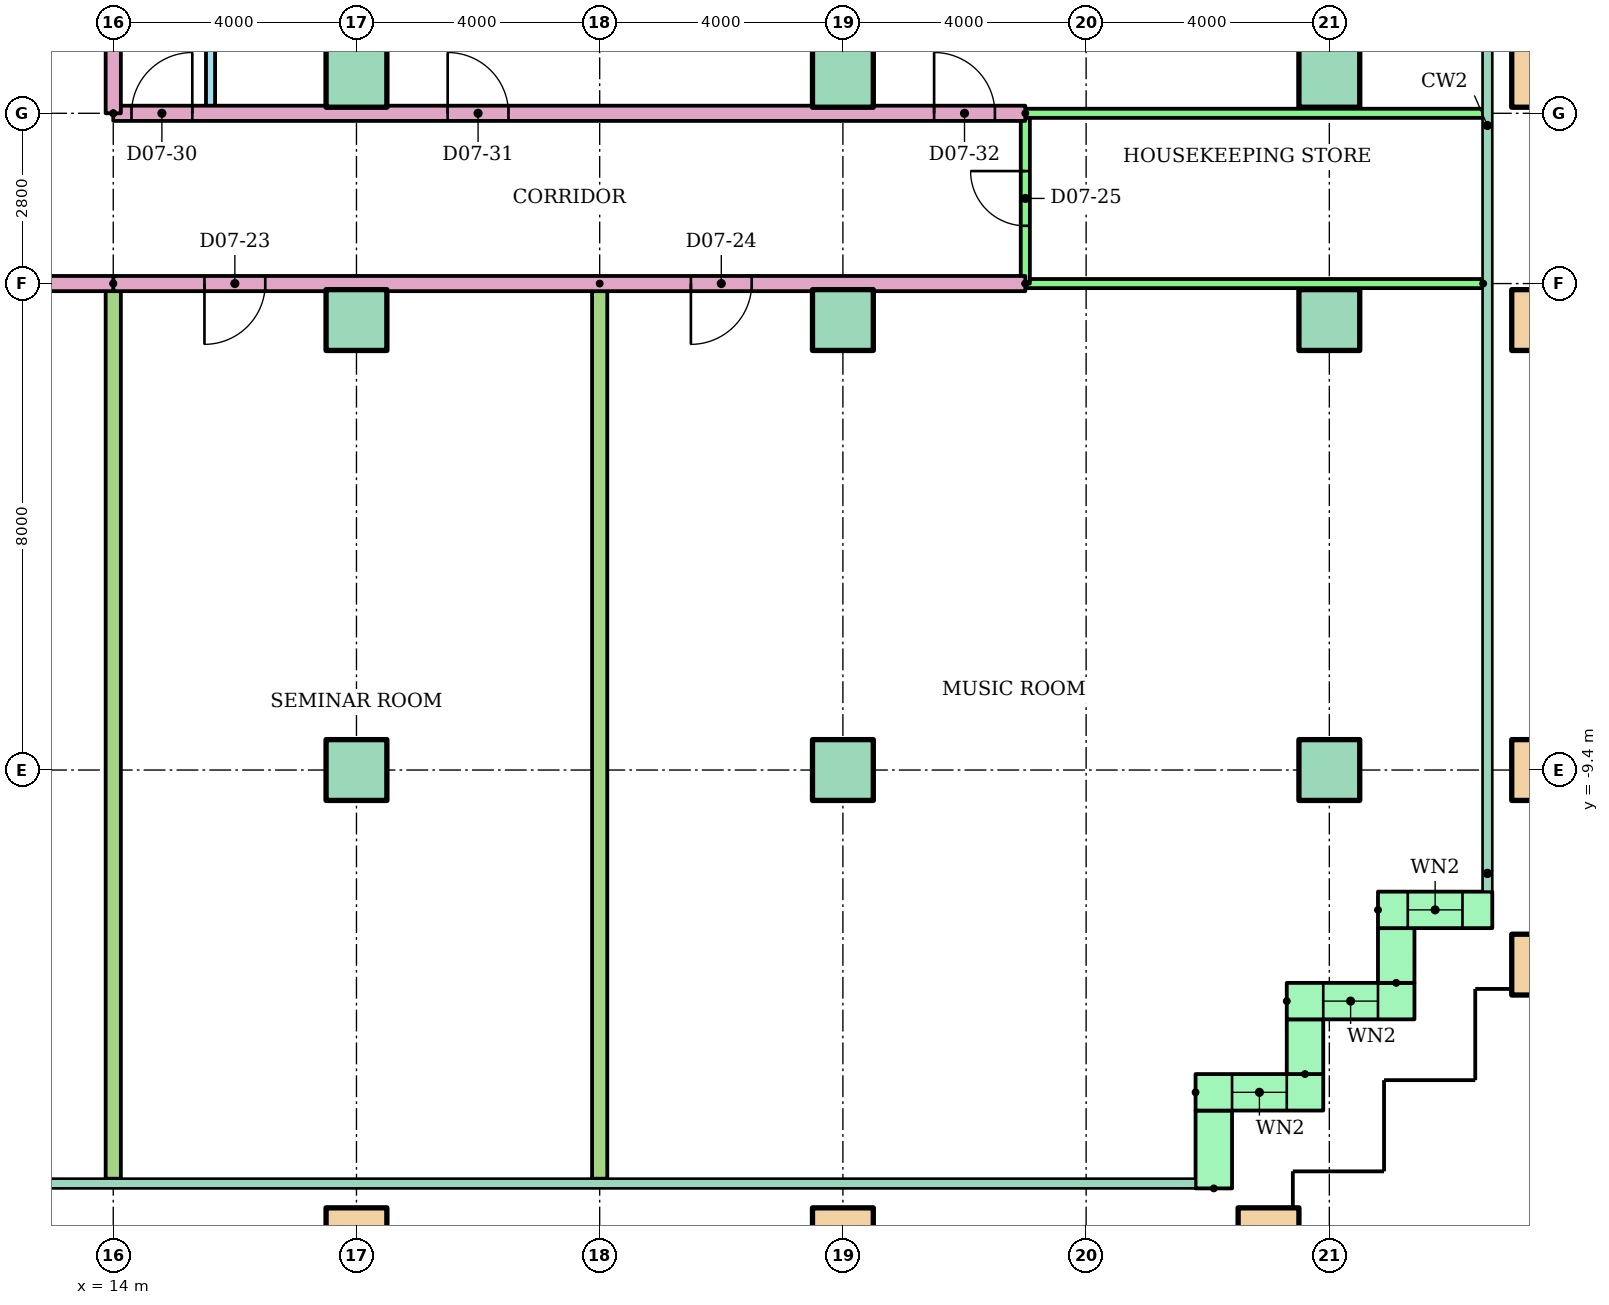
"""IFC4 building model, lengths in metres.
Left out: names, types, materials, properties, quantities, classifications, styles, units other than length and angle.
Written with IfcOpenShell. Run it as: python <this file> out.ifc"""

import sys

from ifc_helpers import new_model, si_unit, direction, frame, frame_2d, origin, origin_2d, place, context, subcontext, project, spatial, rectangle, hollow_rectangle, extrude, element, fill, save


model = new_model("IFC4")
c1 = context("Model", 3, precision=1e-05, world=origin(), true_north=direction((0.0, 1.0)))
c2 = subcontext(c1, "Body", "Model", "MODEL_VIEW")
j1 = project(units=[si_unit("LENGTHUNIT", "METRE"), si_unit("PLANEANGLEUNIT", "RADIAN")], contexts=[c1])
p1 = place(None, origin())
s1 = spatial("IfcSite", under=j1, at=p1, CompositionType="ELEMENT")
p2 = place(p1, origin())
s2 = spatial("IfcBuilding", under=s1, at=p2, CompositionType="ELEMENT")
p3 = place(p2, frame((0.0, 0.0, 29.9)))
s3 = spatial("IfcBuildingStorey", under=s2, at=p3, CompositionType="ELEMENT", Elevation=29.9)
for number, where in (
    (1, (18.0, -17.1, 0.0)),
    (2, (26.0, -17.1, 0.0)),
    (3, (33.0, -17.1, 0.0)),
    (4, (37.5, -12.6, 0.0)),
):
    element("IfcColumn", number, at=place(p3, frame(where)), inside=s3, PredefinedType="COLUMN", context=c2, shape_type="SweptSolid", body=[
        extrude(hollow_rectangle(XDim=1.0, YDim=1.0, WallThickness=0.05, at=origin_2d()), origin(), (0.0, 0.0, 1.0), 3.9),
    ])
for number, where in (
    (5, (18.0, -9.4, 0.0)),
    (6, (26.0, -9.4, 0.0)),
    (7, (34.0, -9.4, 0.0)),
):
    element("IfcColumn", number, at=place(p3, frame(where)), inside=s3, PredefinedType="COLUMN", context=c2, shape_type="SweptSolid", body=[
        extrude(rectangle(XDim=1.0, YDim=1.0, at=origin_2d()), origin(), (0.0, 0.0, 1.0), 3.9),
    ])
p4 = place(p3, frame((37.5, -9.4, 0.0)))
e8 = element("IfcColumn", 8, at=p4, inside=s3, PredefinedType="COLUMN", context=c2, shape_type="SweptSolid", body=[
    extrude(hollow_rectangle(XDim=1.0, YDim=1.0, WallThickness=0.05, at=origin_2d()), origin(), (0.0, 0.0, 1.0), 3.9),
])
for number, where in (
    (9, (18.0, -2.0, 0.0)),
    (10, (26.0, -2.0, 0.0)),
    (11, (34.0, -2.0, 0.0)),
):
    element("IfcColumn", number, at=place(p3, frame(where)), inside=s3, PredefinedType="COLUMN", context=c2, shape_type="SweptSolid", body=[
        extrude(rectangle(XDim=1.0, YDim=1.0, at=origin_2d()), origin(), (0.0, 0.0, 1.0), 3.9),
    ])
p5 = place(p3, frame((37.5, -2.0, 0.0)))
e12 = element("IfcColumn", 12, at=p5, inside=s3, PredefinedType="COLUMN", context=c2, shape_type="SweptSolid", body=[
    extrude(hollow_rectangle(XDim=1.0, YDim=1.0, WallThickness=0.05, at=origin_2d()), origin(), (0.0, 0.0, 1.0), 3.9),
])
for number, where in (
    (13, (18.0, 2.0, 0.0)),
    (14, (26.0, 2.0, 0.0)),
    (15, (34.0, 2.0, 0.0)),
):
    element("IfcColumn", number, at=place(p3, frame(where)), inside=s3, PredefinedType="COLUMN", context=c2, shape_type="SweptSolid", body=[
        extrude(rectangle(XDim=1.0, YDim=1.0, at=origin_2d()), origin(), (0.0, 0.0, 1.0), 3.9),
    ])
p6 = place(p3, frame((37.5, 2.0, 0.0)))
e16 = element("IfcColumn", 16, at=p6, inside=s3, PredefinedType="COLUMN", context=c2, shape_type="SweptSolid", body=[
    extrude(hollow_rectangle(XDim=1.0, YDim=1.0, WallThickness=0.05, at=origin_2d()), origin(), (0.0, 0.0, 1.0), 3.9),
])
p7 = place(p3, frame((32.1, -16.28, 0.0), z_axis=(0.0, 0.0, 1.0), x_axis=(0.0, 1.0, 0.0)))
e17 = element("IfcWall", 17, at=p7, inside=s3, PredefinedType="STANDARD", context=c2, shape_type="SweptSolid", body=[
    extrude(rectangle(XDim=1.28, YDim=0.6, at=frame_2d((0.64, 0.0))), origin(), (0.0, 0.0, 1.0), 3.6),
])
p8 = place(p3, frame((31.8, -14.7, 0.0)))
e18 = element("IfcWall", 18, at=p8, inside=s3, PredefinedType="STANDARD", context=c2, shape_type="SweptSolid", body=[
    extrude(rectangle(XDim=2.1, YDim=0.6, at=frame_2d((1.05, 0.0))), origin(), (0.0, 0.0, 1.0), 3.6),
])
p9 = place(p8, frame((0.6, 0.0, 0.9)))
e19 = element("IfcOpeningElement", 19, at=p9, cuts=e18, PredefinedType="OPENING", context=c2, shape_type="SweptSolid", body=[
    extrude(rectangle(XDim=0.9, YDim=1.8, at=frame_2d((0.45, 0.9))), frame((0.0, 0.31, 0.0), z_axis=(0.0, -1.0, 0.0), x_axis=(1.0, 0.0, 0.0)), (0.0, 0.0, 1.0), 0.62),
])
p10 = place(p3, frame((33.6, -14.4, 0.0), z_axis=(0.0, 0.0, 1.0), x_axis=(0.0, 1.0, 0.0)))
e20 = element("IfcWall", 20, at=p10, inside=s3, PredefinedType="STANDARD", context=c2, shape_type="SweptSolid", body=[
    extrude(rectangle(XDim=0.9, YDim=0.6, at=frame_2d((0.45, 0.0))), origin(), (0.0, 0.0, 1.0), 3.6),
])
p11 = place(p3, frame((33.3, -13.2, 0.0)))
e21 = element("IfcWall", 21, at=p11, inside=s3, PredefinedType="STANDARD", context=c2, shape_type="SweptSolid", body=[
    extrude(rectangle(XDim=2.1, YDim=0.6, at=frame_2d((1.05, 0.0))), origin(), (0.0, 0.0, 1.0), 3.6),
])
p12 = place(p11, frame((0.6, 0.0, 0.9)))
e22 = element("IfcOpeningElement", 22, at=p12, cuts=e21, PredefinedType="OPENING", context=c2, shape_type="SweptSolid", body=[
    extrude(rectangle(XDim=0.9, YDim=1.8, at=frame_2d((0.45, 0.9))), frame((0.0, 0.31, 0.0), z_axis=(0.0, -1.0, 0.0), x_axis=(1.0, 0.0, 0.0)), (0.0, 0.0, 1.0), 0.62),
])
p13 = place(p3, frame((35.1, -12.9, 0.0), z_axis=(0.0, 0.0, 1.0), x_axis=(0.0, 1.0, 0.0)))
e23 = element("IfcWall", 23, at=p13, inside=s3, PredefinedType="STANDARD", context=c2, shape_type="SweptSolid", body=[
    extrude(rectangle(XDim=0.9, YDim=0.6, at=frame_2d((0.45, 0.0))), origin(), (0.0, 0.0, 1.0), 3.6),
])
p14 = place(p3, frame((34.8, -11.7, 0.0)))
e24 = element("IfcWall", 24, at=p14, inside=s3, PredefinedType="STANDARD", context=c2, shape_type="SweptSolid", body=[
    extrude(rectangle(XDim=1.88, YDim=0.6, at=frame_2d((0.94, 0.0))), origin(), (0.0, 0.0, 1.0), 3.6),
])
p15 = place(p14, frame((0.49, 0.0, 0.9)))
e25 = element("IfcOpeningElement", 25, at=p15, cuts=e24, PredefinedType="OPENING", context=c2, shape_type="SweptSolid", body=[
    extrude(rectangle(XDim=0.9, YDim=1.8, at=frame_2d((0.45, 0.9))), frame((0.0, 0.31, 0.0), z_axis=(0.0, -1.0, 0.0), x_axis=(1.0, 0.0, 0.0)), (0.0, 0.0, 1.0), 0.62),
])
p16 = place(p3, frame((29.0, -1.4, 0.0), z_axis=(0.0, 0.0, 1.0), x_axis=(-1.0, 0.0, 0.0)))
e26 = element("IfcWall", 26, at=p16, inside=s3, PredefinedType="PARTITIONING", context=c2, shape_type="SweptSolid", body=[
    extrude(rectangle(XDim=15.0, YDim=0.25, at=frame_2d((7.5, 0.0))), origin(), (0.0, 0.0, 1.0), 3.1),
])
p17 = place(p16, frame((12.5, 0.0, 0.0)))
e27 = element("IfcOpeningElement", 27, at=p17, cuts=e26, PredefinedType="OPENING", context=c2, shape_type="SweptSolid", body=[
    extrude(rectangle(XDim=1.0, YDim=2.1, at=frame_2d((0.5, 1.05))), frame((0.0, 0.135, 0.0), z_axis=(0.0, -1.0, 0.0), x_axis=(1.0, 0.0, 0.0)), (0.0, 0.0, 1.0), 0.27),
])
p18 = place(p16, frame((4.5, 0.0, 0.0)))
e28 = element("IfcOpeningElement", 28, at=p18, cuts=e26, PredefinedType="OPENING", context=c2, shape_type="SweptSolid", body=[
    extrude(rectangle(XDim=1.0, YDim=2.1, at=frame_2d((0.5, 1.05))), frame((0.0, 0.135, 0.0), z_axis=(0.0, -1.0, 0.0), x_axis=(1.0, 0.0, 0.0)), (0.0, 0.0, 1.0), 0.27),
])
p19 = place(p3, frame((36.53, -1.4, 0.0), z_axis=(0.0, 0.0, 1.0), x_axis=(-1.0, 0.0, 0.0)))
e29 = element("IfcWall", 29, at=p19, inside=s3, PredefinedType="PARTITIONING", context=c2, shape_type="SweptSolid", body=[
    extrude(rectangle(XDim=7.53, YDim=0.15, at=frame_2d((3.765, 0.0))), origin(), (0.0, 0.0, 1.0), 3.1),
])
p20 = place(p3, frame((29.0, -1.4, 0.0), z_axis=(0.0, 0.0, 1.0), x_axis=(0.0, 1.0, 0.0)))
e30 = element("IfcWall", 30, at=p20, inside=s3, PredefinedType="PARTITIONING", context=c2, shape_type="SweptSolid", body=[
    extrude(rectangle(XDim=2.8, YDim=0.15, at=frame_2d((1.4, 0.0))), origin(), (0.0, 0.0, 1.0), 3.1),
])
p21 = place(p20, frame((0.95, 0.0, 0.0)))
e31 = element("IfcOpeningElement", 31, at=p21, cuts=e30, PredefinedType="OPENING", context=c2, shape_type="SweptSolid", body=[
    extrude(rectangle(XDim=0.9, YDim=2.1, at=frame_2d((0.45, 1.05))), frame((0.0, 0.085, 0.0), z_axis=(0.0, -1.0, 0.0), x_axis=(1.0, 0.0, 0.0)), (0.0, 0.0, 1.0), 0.17),
])
for number, where, z_axis, x_axis in (
    (32, (14.0, -1.4, 0.0), (0.0, 0.0, 1.0), (0.0, -1.0, 0.0)),
    (33, (22.0, -1.4, 0.0), (0.0, 0.0, 1.0), (0.0, -1.0, 0.0)),
):
    element("IfcWall", number, at=place(p3, frame(where, z_axis=z_axis, x_axis=x_axis)), inside=s3, PredefinedType="PARTITIONING", context=c2, shape_type="SweptSolid", body=[
        extrude(rectangle(XDim=14.721, YDim=0.25, at=frame_2d((7.361, 0.0))), origin(), (0.0, 0.0, 1.0), 3.1),
    ])
p22 = place(p3, frame((14.0, 1.4, 0.0)))
e34 = element("IfcWall", 34, at=p22, inside=s3, PredefinedType="PARTITIONING", context=c2, shape_type="SweptSolid", body=[
    extrude(rectangle(XDim=15.0, YDim=0.25, at=frame_2d((7.5, 0.0))), origin(), (0.0, 0.0, 1.0), 3.1),
])
p23 = place(p22, frame((0.3, 0.0, 0.0)))
e35 = element("IfcOpeningElement", 35, at=p23, cuts=e34, PredefinedType="OPENING", context=c2, shape_type="SweptSolid", body=[
    extrude(rectangle(XDim=1.0, YDim=2.1, at=frame_2d((0.5, 1.05))), frame((0.0, 0.135, 0.0), z_axis=(0.0, -1.0, 0.0), x_axis=(1.0, 0.0, 0.0)), (0.0, 0.0, 1.0), 0.27),
])
p24 = place(p22, frame((5.5, 0.0, 0.0)))
e36 = element("IfcOpeningElement", 36, at=p24, cuts=e34, PredefinedType="OPENING", context=c2, shape_type="SweptSolid", body=[
    extrude(rectangle(XDim=1.0, YDim=2.1, at=frame_2d((0.5, 1.05))), frame((0.0, 0.135, 0.0), z_axis=(0.0, -1.0, 0.0), x_axis=(1.0, 0.0, 0.0)), (0.0, 0.0, 1.0), 0.27),
])
p25 = place(p22, frame((13.5, 0.0, 0.0)))
e37 = element("IfcOpeningElement", 37, at=p25, cuts=e34, PredefinedType="OPENING", context=c2, shape_type="SweptSolid", body=[
    extrude(rectangle(XDim=1.0, YDim=2.1, at=frame_2d((0.5, 1.05))), frame((0.0, 0.135, 0.0), z_axis=(0.0, -1.0, 0.0), x_axis=(1.0, 0.0, 0.0)), (0.0, 0.0, 1.0), 0.27),
])
p26 = place(p3, frame((29.0, 1.4, 0.0)))
e38 = element("IfcWall", 38, at=p26, inside=s3, PredefinedType="PARTITIONING", context=c2, shape_type="SweptSolid", body=[
    extrude(rectangle(XDim=7.53, YDim=0.15, at=frame_2d((3.765, 0.0))), origin(), (0.0, 0.0, 1.0), 3.1),
])
p27 = place(p3, frame((15.6, 18.521, 0.0), z_axis=(0.0, 0.0, 1.0), x_axis=(0.0, -1.0, 0.0)))
e39 = element("IfcWall", 39, at=p27, inside=s3, PredefinedType="PARTITIONING", context=c2, shape_type="SweptSolid", body=[
    extrude(rectangle(XDim=17.121, YDim=0.15, at=frame_2d((8.561, 0.0))), origin(), (0.0, 0.0, 1.0), 3.1),
])
p28 = place(p27, frame((15.071, 0.0, 0.0)))
e40 = element("IfcOpeningElement", 40, at=p28, cuts=e39, PredefinedType="OPENING", context=c2, shape_type="SweptSolid", body=[
    extrude(rectangle(XDim=0.9, YDim=2.1, at=frame_2d((0.45, 1.05))), frame((0.0, 0.085, 0.0), z_axis=(0.0, -1.0, 0.0), x_axis=(1.0, 0.0, 0.0)), (0.0, 0.0, 1.0), 0.17),
])
p29 = place(p27, frame((10.071, 0.0, 0.0)))
e41 = element("IfcOpeningElement", 41, at=p29, cuts=e39, PredefinedType="OPENING", context=c2, shape_type="SweptSolid", body=[
    extrude(rectangle(XDim=0.9, YDim=2.1, at=frame_2d((0.45, 1.05))), frame((0.0, 0.085, 0.0), z_axis=(0.0, -1.0, 0.0), x_axis=(1.0, 0.0, 0.0)), (0.0, 0.0, 1.0), 0.17),
])
p30 = place(p27, frame((5.021, 0.0, 0.0)))
e42 = element("IfcOpeningElement", 42, at=p30, cuts=e39, PredefinedType="OPENING", context=c2, shape_type="SweptSolid", body=[
    extrude(rectangle(XDim=1.0, YDim=2.1, at=frame_2d((0.5, 1.05))), frame((0.0, 0.085, 0.0), z_axis=(0.0, -1.0, 0.0), x_axis=(1.0, 0.0, 0.0)), (0.0, 0.0, 1.0), 0.17),
])
p31 = place(p27, frame((1.471, 0.0, 0.0)))
e43 = element("IfcOpeningElement", 43, at=p31, cuts=e39, PredefinedType="OPENING", context=c2, shape_type="SweptSolid", body=[
    extrude(rectangle(XDim=0.9, YDim=2.1, at=frame_2d((0.45, 1.05))), frame((0.0, 0.085, 0.0), z_axis=(0.0, -1.0, 0.0), x_axis=(1.0, 0.0, 0.0)), (0.0, 0.0, 1.0), 0.17),
])
for number, where, z_axis, x_axis in (
    (44, (18.0, 18.521, 0.0), (0.0, 0.0, 1.0), (0.0, -1.0, 0.0)),
    (45, (26.0, 18.521, 0.0), (0.0, 0.0, 1.0), (0.0, -1.0, 0.0)),
):
    element("IfcWall", number, at=place(p3, frame(where, z_axis=z_axis, x_axis=x_axis)), inside=s3, PredefinedType="PARTITIONING", context=c2, shape_type="SweptSolid", body=[
        extrude(rectangle(XDim=17.121, YDim=0.25, at=frame_2d((8.561, 0.0))), origin(), (0.0, 0.0, 1.0), 3.1),
    ])
p32 = place(p3, frame((14.0, -1.4, 0.0), z_axis=(0.0, 0.0, 1.0), x_axis=(-1.0, 0.0, 0.0)))
e46 = element("IfcWall", 46, at=p32, inside=s3, PredefinedType="PARTITIONING", context=c2, shape_type="SweptSolid", body=[
    extrude(rectangle(XDim=28.0, YDim=0.25, at=frame_2d((14.0, 0.0))), origin(), (0.0, 0.0, 1.0), 3.1),
])
p33 = place(p32, frame((25.5, 0.0, 0.0)))
e47 = element("IfcOpeningElement", 47, at=p33, cuts=e46, PredefinedType="OPENING", context=c2, shape_type="SweptSolid", body=[
    extrude(rectangle(XDim=1.0, YDim=2.1, at=frame_2d((0.5, 1.05))), frame((0.0, 0.135, 0.0), z_axis=(0.0, -1.0, 0.0), x_axis=(1.0, 0.0, 0.0)), (0.0, 0.0, 1.0), 0.27),
])
p34 = place(p32, frame((1.5, 0.0, 0.0)))
e48 = element("IfcOpeningElement", 48, at=p34, cuts=e46, PredefinedType="OPENING", context=c2, shape_type="SweptSolid", body=[
    extrude(rectangle(XDim=1.0, YDim=2.1, at=frame_2d((0.5, 1.05))), frame((0.0, 0.135, 0.0), z_axis=(0.0, -1.0, 0.0), x_axis=(1.0, 0.0, 0.0)), (0.0, 0.0, 1.0), 0.27),
])
p35 = place(p3, frame((14.0, 1.4, 0.0), z_axis=(0.0, 0.0, 1.0), x_axis=(0.0, 1.0, 0.0)))
e49 = element("IfcWall", 49, at=p35, inside=s3, PredefinedType="PARTITIONING", context=c2, shape_type="SweptSolid", body=[
    extrude(rectangle(XDim=1.6, YDim=0.25, at=frame_2d((0.8, 0.0))), origin(), (0.0, 0.0, 1.0), 3.1),
])
p36 = place(p9, origin())
e50 = element("IfcWindow", 50, at=p36, inside=s3, PartitioningType="SINGLE_PANEL", PredefinedType="WINDOW", context=c2, shape_type="SweptSolid", body=[
    extrude(rectangle(XDim=0.9, YDim=1.8, at=frame_2d((0.45, 0.9))), frame((0.0, 0.03, 0.0), z_axis=(0.0, -1.0, 0.0), x_axis=(1.0, 0.0, 0.0)), (0.0, 0.0, 1.0), 0.06),
])
fill(e19, e50)
p37 = place(p12, origin())
e51 = element("IfcWindow", 51, at=p37, inside=s3, PartitioningType="SINGLE_PANEL", PredefinedType="WINDOW", context=c2, shape_type="SweptSolid", body=[
    extrude(rectangle(XDim=0.9, YDim=1.8, at=frame_2d((0.45, 0.9))), frame((0.0, 0.03, 0.0), z_axis=(0.0, -1.0, 0.0), x_axis=(1.0, 0.0, 0.0)), (0.0, 0.0, 1.0), 0.06),
])
fill(e22, e51)
p38 = place(p15, origin())
e52 = element("IfcWindow", 52, at=p38, inside=s3, PartitioningType="SINGLE_PANEL", PredefinedType="WINDOW", context=c2, shape_type="SweptSolid", body=[
    extrude(rectangle(XDim=0.9, YDim=1.8, at=frame_2d((0.45, 0.9))), frame((0.0, 0.03, 0.0), z_axis=(0.0, -1.0, 0.0), x_axis=(1.0, 0.0, 0.0)), (0.0, 0.0, 1.0), 0.06),
])
fill(e25, e52)
p39 = place(p17, origin())
e53 = element("IfcDoor", 53, at=p39, inside=s3, OperationType="SINGLE_SWING_RIGHT", PredefinedType="DOOR", context=c2, shape_type="SweptSolid", body=[
    extrude(rectangle(XDim=1.0, YDim=2.1, at=frame_2d((0.5, 1.05))), frame((0.0, 0.025, 0.0), z_axis=(0.0, -1.0, 0.0), x_axis=(1.0, 0.0, 0.0)), (0.0, 0.0, 1.0), 0.05),
])
fill(e27, e53)
p40 = place(p18, origin())
e54 = element("IfcDoor", 54, at=p40, inside=s3, OperationType="SINGLE_SWING_RIGHT", PredefinedType="DOOR", context=c2, shape_type="SweptSolid", body=[
    extrude(rectangle(XDim=1.0, YDim=2.1, at=frame_2d((0.5, 1.05))), frame((0.0, 0.025, 0.0), z_axis=(0.0, -1.0, 0.0), x_axis=(1.0, 0.0, 0.0)), (0.0, 0.0, 1.0), 0.05),
])
fill(e28, e54)
p41 = place(p21, origin())
e55 = element("IfcDoor", 55, at=p41, inside=s3, OperationType="SINGLE_SWING_RIGHT", PredefinedType="DOOR", context=c2, shape_type="SweptSolid", body=[
    extrude(rectangle(XDim=0.9, YDim=2.1, at=frame_2d((0.45, 1.05))), frame((0.0, 0.025, 0.0), z_axis=(0.0, -1.0, 0.0), x_axis=(1.0, 0.0, 0.0)), (0.0, 0.0, 1.0), 0.05),
])
fill(e31, e55)
p42 = place(p23, origin())
e56 = element("IfcDoor", 56, at=p42, inside=s3, OperationType="SINGLE_SWING_RIGHT", PredefinedType="DOOR", context=c2, shape_type="SweptSolid", body=[
    extrude(rectangle(XDim=1.0, YDim=2.1, at=frame_2d((0.5, 1.05))), frame((0.0, 0.025, 0.0), z_axis=(0.0, -1.0, 0.0), x_axis=(1.0, 0.0, 0.0)), (0.0, 0.0, 1.0), 0.05),
])
fill(e35, e56)
p43 = place(p24, origin())
e57 = element("IfcDoor", 57, at=p43, inside=s3, OperationType="SINGLE_SWING_LEFT", PredefinedType="DOOR", context=c2, shape_type="SweptSolid", body=[
    extrude(rectangle(XDim=1.0, YDim=2.1, at=frame_2d((0.5, 1.05))), frame((0.0, 0.025, 0.0), z_axis=(0.0, -1.0, 0.0), x_axis=(1.0, 0.0, 0.0)), (0.0, 0.0, 1.0), 0.05),
])
fill(e36, e57)
p44 = place(p25, origin())
e58 = element("IfcDoor", 58, at=p44, inside=s3, OperationType="SINGLE_SWING_LEFT", PredefinedType="DOOR", context=c2, shape_type="SweptSolid", body=[
    extrude(rectangle(XDim=1.0, YDim=2.1, at=frame_2d((0.5, 1.05))), frame((0.0, 0.025, 0.0), z_axis=(0.0, -1.0, 0.0), x_axis=(1.0, 0.0, 0.0)), (0.0, 0.0, 1.0), 0.05),
])
fill(e37, e58)
save(model, sys.argv[1])
